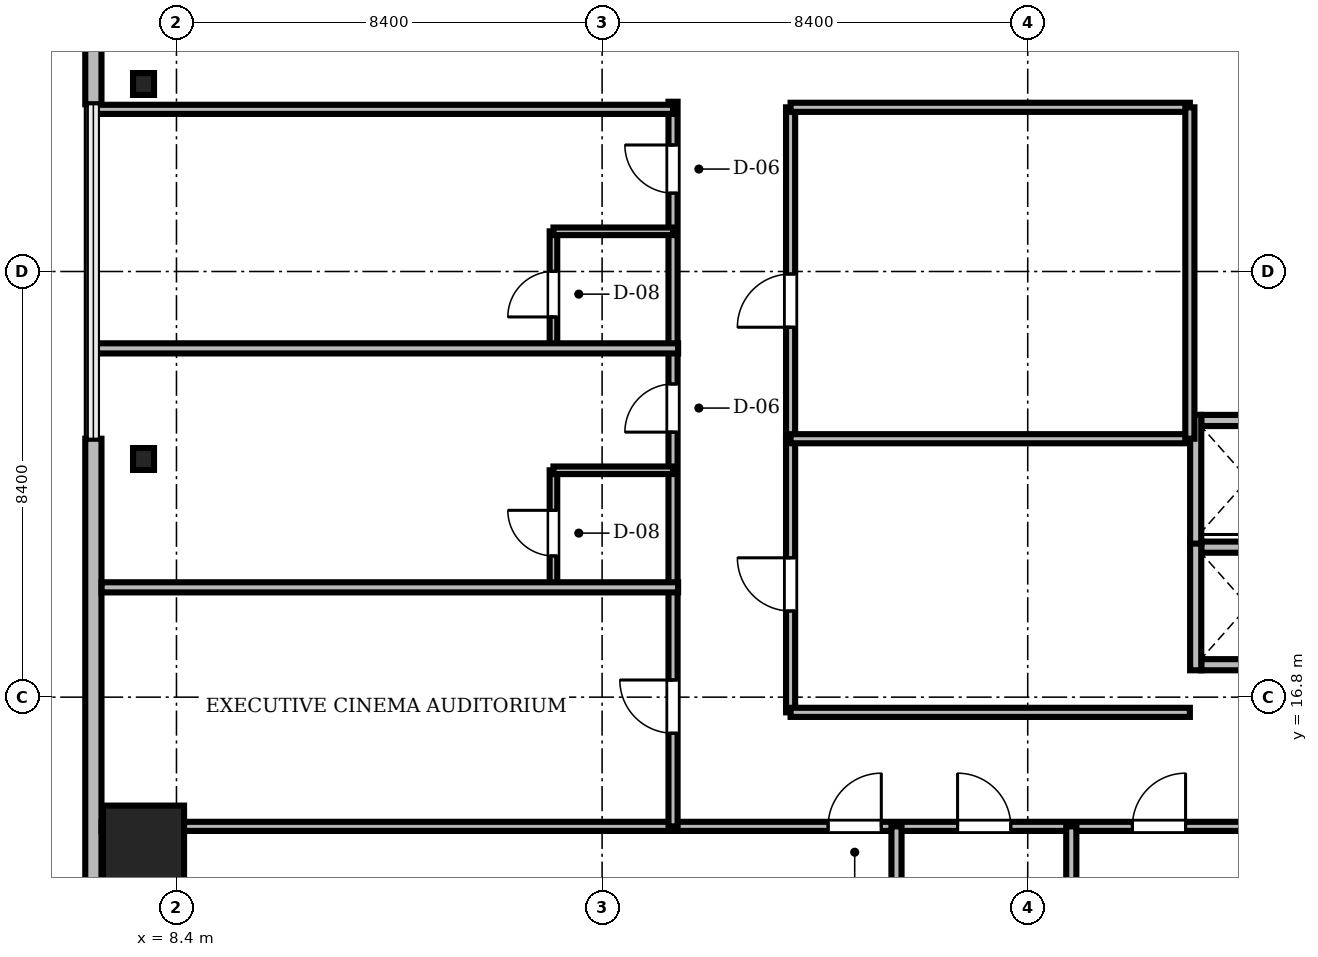
"""IFC4 building model, lengths in metres.
Left out: names, types, materials, properties, quantities, classifications, styles, units other than length and angle.
Written with IfcOpenShell. Run it as: python <this file> out.ifc"""

import sys

from ifc_helpers import new_model, si_unit, direction, frame, frame_2d, origin, origin_2d, place, context, subcontext, project, spatial, rectangle, i_section, extrude, source, transform, mapped, element, fill, save


model = new_model("IFC4")
c1 = context("Model", 3, precision=1e-05, world=origin(), true_north=direction((0.0, 1.0)))
c2 = subcontext(c1, "Body", "Model", "MODEL_VIEW")
j1 = project(units=[si_unit("LENGTHUNIT", "METRE"), si_unit("PLANEANGLEUNIT", "RADIAN")], contexts=[c1])
p1 = place(None, origin())
s1 = spatial("IfcSite", under=j1, at=p1, CompositionType="ELEMENT")
p2 = place(p1, origin())
s2 = spatial("IfcBuilding", under=s1, at=p2, CompositionType="ELEMENT")
p3 = place(p2, frame((0.0, 0.0, 133.5)))
s3 = spatial("IfcBuildingStorey", under=s2, at=p3, CompositionType="ELEMENT", Elevation=133.5)
m1 = source(origin(), c2, "Body", "SweptSolid", [
    extrude(rectangle(XDim=1.6, YDim=1.6, at=origin_2d()), origin(), (0.0, 0.0, 1.0), 3.46),
])
p4 = place(p3, frame((7.75, 13.86, 0.0), z_axis=(0.0, 0.0, 1.0), x_axis=(1.0, 0.0, 0.0)))
e1 = element("IfcColumn", 1, at=p4, inside=s3, PredefinedType="COLUMN", context=c2, shape_type="MappedRepresentation", body=[
    mapped(m1, transform((0.0, 0.0, 0.0), scale=1.0)),
])
m2 = source(origin(), c2, "Body", "SweptSolid", [
    extrude(i_section(OverallWidth=0.414, OverallDepth=0.432, WebThickness=0.026, FlangeThickness=0.04, FilletRadius=0.015, at=origin_2d()), origin(), (0.0, 0.0, 1.0), 3.46),
])
for number, where, z_axis, x_axis in (
    (2, (7.75, 28.9, 0.0), (0.0, 0.0, 1.0), (1.0, 0.0, 0.0)),
    (3, (7.75, 21.5, 0.0), (0.0, 0.0, 1.0), (1.0, 0.0, 0.0)),
):
    element("IfcColumn", number, at=place(p3, frame(where, z_axis=z_axis, x_axis=x_axis)), inside=s3, PredefinedType="COLUMN", context=c2, shape_type="MappedRepresentation", body=[
        mapped(m2, transform((0.0, 0.0, 0.0), scale=1.0)),
    ])
m3 = source(origin(), c2, "Body", "SweptSolid", [
    extrude(rectangle(XDim=15.6, YDim=0.32, at=frame_2d((7.8, 0.0))), origin(), (0.0, 0.0, 1.0), 3.46),
])
p5 = place(p3, frame((6.76, 44.1, 0.0), z_axis=(0.0, 0.0, 1.0), x_axis=(0.0, -1.0, 0.0)))
e4 = element("IfcWall", 4, at=p5, inside=s3, PredefinedType="SOLIDWALL", context=c2, shape_type="MappedRepresentation", body=[
    mapped(m3, transform((0.0, 0.0, 0.0), scale=1.0)),
])
m4 = source(origin(), c2, "Body", "SweptSolid", [
    extrude(rectangle(XDim=1.4, YDim=2.3, at=frame_2d((0.7, 1.15))), frame((0.0, 0.17, 0.0), z_axis=(0.0, -1.0, 0.0), x_axis=(1.0, 0.0, 0.0)), (0.0, 0.0, 1.0), 0.34),
])
p6 = place(p5, frame((9.61, 0.0, 0.0)))
e5 = element("IfcOpeningElement", 5, at=p6, cuts=e4, PredefinedType="OPENING", context=c2, shape_type="MappedRepresentation", body=[
    mapped(m4, transform((0.0, 0.0, 0.0), scale=1.0)),
])
m5 = source(origin(), c2, "Body", "SweptSolid", [
    extrude(rectangle(XDim=2.8, YDim=2.4, at=frame_2d((1.4, 1.2))), frame((0.0, 0.17, 0.0), z_axis=(0.0, -1.0, 0.0), x_axis=(1.0, 0.0, 0.0)), (0.0, 0.0, 1.0), 0.34),
])
p7 = place(p5, frame((2.705, 0.0, 0.72)))
e6 = element("IfcOpeningElement", 6, at=p7, cuts=e4, PredefinedType="OPENING", context=c2, shape_type="MappedRepresentation", body=[
    mapped(m5, transform((0.0, 0.0, 0.0), scale=1.0)),
])
m6 = source(origin(), c2, "Body", "SweptSolid", [
    extrude(rectangle(XDim=15.6, YDim=0.32, at=frame_2d((7.8, 0.0))), origin(), (0.0, 0.0, 1.0), 3.46),
])
p8 = place(p3, frame((6.76, 21.9, 0.0), z_axis=(0.0, 0.0, 1.0), x_axis=(0.0, -1.0, 0.0)))
e7 = element("IfcWall", 7, at=p8, inside=s3, PredefinedType="SOLIDWALL", context=c2, shape_type="MappedRepresentation", body=[
    mapped(m6, transform((0.0, 0.0, 0.0), scale=1.0)),
])
p9 = place(p8, frame((10.095, 0.0, 0.72)))
e8 = element("IfcOpeningElement", 8, at=p9, cuts=e7, PredefinedType="OPENING", context=c2, shape_type="MappedRepresentation", body=[
    mapped(m5, transform((0.0, 0.0, 0.0), scale=1.0)),
])
m7 = source(origin(), c2, "Body", "SweptSolid", [
    extrude(rectangle(XDim=1.85, YDim=0.22, at=frame_2d((0.925, 0.0))), origin(), (0.0, 0.0, 1.0), 3.46),
])
for number, where, z_axis, x_axis in (
    (9, (28.625, 17.44, 0.0), (0.0, 0.0, 1.0), (1.0, 0.0, 0.0)),
    (10, (28.625, 19.76, 0.0), (0.0, 0.0, 1.0), (1.0, 0.0, 0.0)),
):
    element("IfcWall", number, at=place(p3, frame(where, z_axis=z_axis, x_axis=x_axis)), inside=s3, PredefinedType="SOLIDWALL", context=c2, shape_type="MappedRepresentation", body=[
        mapped(m7, transform((0.0, 0.0, 0.0), scale=1.0)),
    ])
m8 = source(origin(), c2, "Body", "SweptSolid", [
    extrude(rectangle(XDim=2.54, YDim=0.22, at=frame_2d((1.27, 0.0))), origin(), (0.0, 0.0, 1.0), 3.46),
])
p10 = place(p3, frame((28.515, 17.33, 0.0), z_axis=(0.0, 0.0, 1.0), x_axis=(0.0, 1.0, 0.0)))
e11 = element("IfcWall", 11, at=p10, inside=s3, PredefinedType="SOLIDWALL", context=c2, shape_type="MappedRepresentation", body=[
    mapped(m8, transform((0.0, 0.0, 0.0), scale=1.0)),
])
p11 = place(p3, frame((28.625, 22.26, 0.0), z_axis=(0.0, 0.0, 1.0), x_axis=(1.0, 0.0, 0.0)))
e12 = element("IfcWall", 12, at=p11, inside=s3, PredefinedType="SOLIDWALL", context=c2, shape_type="MappedRepresentation", body=[
    mapped(m7, transform((0.0, 0.0, 0.0), scale=1.0)),
])
p12 = place(p3, frame((28.515, 19.83, 0.0), z_axis=(0.0, 0.0, 1.0), x_axis=(0.0, 1.0, 0.0)))
e13 = element("IfcWall", 13, at=p12, inside=s3, PredefinedType="SOLIDWALL", context=c2, shape_type="MappedRepresentation", body=[
    mapped(m8, transform((0.0, 0.0, 0.0), scale=1.0)),
])
m9 = source(origin(), c2, "Body", "SweptSolid", [
    extrude(rectangle(XDim=46.156, YDim=0.18, at=frame_2d((23.078, 0.0))), origin(), (0.0, 0.0, 1.0), 2.702),
])
p13 = place(p3, frame((6.922, 14.25, 0.0), z_axis=(0.0, 0.0, 1.0), x_axis=(1.0, 0.0, 0.0)))
e14 = element("IfcWall", 14, at=p13, inside=s3, PredefinedType="PARTITIONING", context=c2, shape_type="MappedRepresentation", body=[
    mapped(m9, transform((0.0, 0.0, 0.0), scale=1.0)),
])
m10 = source(origin(), c2, "Body", "SweptSolid", [
    extrude(rectangle(XDim=1.05, YDim=2.2, at=frame_2d((0.525, 1.1))), frame((0.0, 0.1, 0.0), z_axis=(0.0, -1.0, 0.0), x_axis=(1.0, 0.0, 0.0)), (0.0, 0.0, 1.0), 0.2),
])
p14 = place(p13, frame((14.338, 0.0, 0.0)))
e15 = element("IfcOpeningElement", 15, at=p14, cuts=e14, PredefinedType="OPENING", context=c2, shape_type="MappedRepresentation", body=[
    mapped(m10, transform((0.0, 0.0, 0.0), scale=1.0)),
])
p15 = place(p13, frame((16.893, 0.0, 0.0)))
e16 = element("IfcOpeningElement", 16, at=p15, cuts=e14, PredefinedType="OPENING", context=c2, shape_type="MappedRepresentation", body=[
    mapped(m10, transform((0.0, 0.0, 0.0), scale=1.0)),
])
p16 = place(p13, frame((20.344, 0.0, 0.0)))
e17 = element("IfcOpeningElement", 17, at=p16, cuts=e14, PredefinedType="OPENING", context=c2, shape_type="MappedRepresentation", body=[
    mapped(m10, transform((0.0, 0.0, 0.0), scale=1.0)),
])
p17 = place(p13, frame((23.793, 0.0, 0.0)))
e18 = element("IfcOpeningElement", 18, at=p17, cuts=e14, PredefinedType="OPENING", context=c2, shape_type="MappedRepresentation", body=[
    mapped(m10, transform((0.0, 0.0, 0.0), scale=1.0)),
])
p18 = place(p13, frame((27.479, 0.0, 0.0)))
e19 = element("IfcOpeningElement", 19, at=p18, cuts=e14, PredefinedType="OPENING", context=c2, shape_type="MappedRepresentation", body=[
    mapped(m10, transform((0.0, 0.0, 0.0), scale=1.0)),
])
p19 = place(p13, frame((31.666, 0.0, 0.0)))
e20 = element("IfcOpeningElement", 20, at=p19, cuts=e14, PredefinedType="OPENING", context=c2, shape_type="MappedRepresentation", body=[
    mapped(m10, transform((0.0, 0.0, 0.0), scale=1.0)),
])
p20 = place(p13, frame((36.869, 0.0, 0.0)))
e21 = element("IfcOpeningElement", 21, at=p20, cuts=e14, PredefinedType="OPENING", context=c2, shape_type="MappedRepresentation", body=[
    mapped(m10, transform((0.0, 0.0, 0.0), scale=1.0)),
])
p21 = place(p13, frame((41.828, 0.0, 0.0)))
e22 = element("IfcOpeningElement", 22, at=p21, cuts=e14, PredefinedType="OPENING", context=c2, shape_type="MappedRepresentation", body=[
    mapped(m10, transform((0.0, 0.0, 0.0), scale=1.0)),
])
m11 = source(origin(), c2, "Body", "SweptSolid", [
    extrude(rectangle(XDim=14.3, YDim=0.18, at=frame_2d((7.15, 0.0))), origin(), (0.0, 0.0, 1.0), 2.852),
])
p22 = place(p3, frame((18.2, 14.25, 0.0), z_axis=(0.0, 0.0, 1.0), x_axis=(0.0, 1.0, 0.0)))
e23 = element("IfcWall", 23, at=p22, inside=s3, PredefinedType="PARTITIONING", context=c2, shape_type="MappedRepresentation", body=[
    mapped(m11, transform((0.0, 0.0, 0.0), scale=1.0)),
])
p23 = place(p22, frame((1.838, 0.0, 0.0)))
e24 = element("IfcOpeningElement", 24, at=p23, cuts=e23, PredefinedType="OPENING", context=c2, shape_type="MappedRepresentation", body=[
    mapped(m10, transform((0.0, 0.0, 0.0), scale=1.0)),
])
m12 = source(origin(), c2, "Body", "SweptSolid", [
    extrude(rectangle(XDim=0.95, YDim=2.15, at=frame_2d((0.475, 1.075))), frame((0.0, 0.1, 0.0), z_axis=(0.0, -1.0, 0.0), x_axis=(1.0, 0.0, 0.0)), (0.0, 0.0, 1.0), 0.2),
])
p24 = place(p22, frame((7.78, 0.0, 0.0)))
e25 = element("IfcOpeningElement", 25, at=p24, cuts=e23, PredefinedType="OPENING", context=c2, shape_type="MappedRepresentation", body=[
    mapped(m12, transform((0.0, 0.0, 0.0), scale=1.0)),
])
p25 = place(p22, frame((12.497, 0.0, 0.0)))
e26 = element("IfcOpeningElement", 26, at=p25, cuts=e23, PredefinedType="OPENING", context=c2, shape_type="MappedRepresentation", body=[
    mapped(m12, transform((0.0, 0.0, 0.0), scale=1.0)),
])
m13 = source(origin(), c2, "Body", "SweptSolid", [
    extrude(rectangle(XDim=6.54, YDim=0.18, at=frame_2d((3.27, 0.0))), origin(), (0.0, 0.0, 1.0), 2.852),
])
p26 = place(p3, frame((20.52, 21.9, 0.0), z_axis=(0.0, 0.0, 1.0), x_axis=(0.0, 1.0, 0.0)))
e27 = element("IfcWall", 27, at=p26, inside=s3, PredefinedType="PARTITIONING", context=c2, shape_type="MappedRepresentation", body=[
    mapped(m13, transform((0.0, 0.0, 0.0), scale=1.0)),
])
p27 = place(p26, frame((2.2, 0.0, 0.0)))
e28 = element("IfcOpeningElement", 28, at=p27, cuts=e27, PredefinedType="OPENING", context=c2, shape_type="MappedRepresentation", body=[
    mapped(m10, transform((0.0, 0.0, 0.0), scale=1.0)),
])
m14 = source(origin(), c2, "Body", "SweptSolid", [
    extrude(rectangle(XDim=5.4, YDim=0.18, at=frame_2d((2.7, 0.0))), origin(), (0.0, 0.0, 1.0), 2.852),
])
p28 = place(p3, frame((20.52, 16.5, 0.0), z_axis=(0.0, 0.0, 1.0), x_axis=(0.0, 1.0, 0.0)))
e29 = element("IfcWall", 29, at=p28, inside=s3, PredefinedType="PARTITIONING", context=c2, shape_type="MappedRepresentation", body=[
    mapped(m14, transform((0.0, 0.0, 0.0), scale=1.0)),
])
p29 = place(p28, frame((2.0, 0.0, 0.0)))
e30 = element("IfcOpeningElement", 30, at=p29, cuts=e29, PredefinedType="OPENING", context=c2, shape_type="MappedRepresentation", body=[
    mapped(m10, transform((0.0, 0.0, 0.0), scale=1.0)),
])
m15 = source(origin(), c2, "Body", "SweptSolid", [
    extrude(rectangle(XDim=2.29, YDim=0.15, at=frame_2d((1.145, 0.0))), origin(), (0.0, 0.0, 1.0), 2.852),
])
p30 = place(p3, frame((15.84, 18.987, 0.0), z_axis=(0.0, 0.0, 1.0), x_axis=(0.0, 1.0, 0.0)))
e31 = element("IfcWall", 31, at=p30, inside=s3, PredefinedType="PARTITIONING", context=c2, shape_type="MappedRepresentation", body=[
    mapped(m15, transform((0.0, 0.0, 0.0), scale=1.0)),
])
m16 = source(origin(), c2, "Body", "SweptSolid", [
    extrude(rectangle(XDim=0.9, YDim=2.1, at=frame_2d((0.45, 1.05))), frame((0.0, 0.085, 0.0), z_axis=(0.0, -1.0, 0.0), x_axis=(1.0, 0.0, 0.0)), (0.0, 0.0, 1.0), 0.17),
])
p31 = place(p30, frame((0.6, 0.0, 0.0)))
e32 = element("IfcOpeningElement", 32, at=p31, cuts=e31, PredefinedType="OPENING", context=c2, shape_type="MappedRepresentation", body=[
    mapped(m16, transform((0.0, 0.0, 0.0), scale=1.0)),
])
m17 = source(origin(), c2, "Body", "SweptSolid", [
    extrude(rectangle(XDim=2.29, YDim=0.15, at=frame_2d((1.145, 0.0))), origin(), (0.0, 0.0, 1.0), 3.46),
])
p32 = place(p3, frame((15.84, 23.703, 0.0), z_axis=(0.0, 0.0, 1.0), x_axis=(0.0, 1.0, 0.0)))
e33 = element("IfcWall", 33, at=p32, inside=s3, PredefinedType="PARTITIONING", context=c2, shape_type="MappedRepresentation", body=[
    mapped(m17, transform((0.0, 0.0, 0.0), scale=1.0)),
])
p33 = place(p32, frame((0.6, 0.0, 0.0)))
e34 = element("IfcOpeningElement", 34, at=p33, cuts=e33, PredefinedType="OPENING", context=c2, shape_type="MappedRepresentation", body=[
    mapped(m16, transform((0.0, 0.0, 0.0), scale=1.0)),
])
m18 = source(origin(), c2, "Body", "SweptSolid", [
    extrude(rectangle(XDim=12.128, YDim=0.2, at=frame_2d((6.064, 0.0))), origin(), (0.0, 0.0, 1.0), 2.702),
])
for number, where, z_axis, x_axis in (
    (35, (22.61, 2.122, 0.0), (0.0, 0.0, 1.0), (0.0, 1.0, 0.0)),
    (36, (26.06, 2.122, 0.0), (0.0, 0.0, 1.0), (0.0, 1.0, 0.0)),
):
    element("IfcWall", number, at=place(p3, frame(where, z_axis=z_axis, x_axis=x_axis)), inside=s3, PredefinedType="PARTITIONING", context=c2, shape_type="MappedRepresentation", body=[
        mapped(m18, transform((0.0, 0.0, 0.0), scale=1.0)),
    ])
m19 = source(origin(), c2, "Body", "SweptSolid", [
    extrude(rectangle(XDim=11.378, YDim=0.2, at=frame_2d((5.689, 0.0))), origin(), (0.0, 0.0, 1.0), 2.702),
])
p34 = place(p3, frame((6.922, 18.967, 0.0), z_axis=(0.0, 0.0, 1.0), x_axis=(1.0, 0.0, 0.0)))
e37 = element("IfcWall", 37, at=p34, inside=s3, PredefinedType="PARTITIONING", context=c2, shape_type="MappedRepresentation", body=[
    mapped(m19, transform((0.0, 0.0, 0.0), scale=1.0)),
])
m20 = source(origin(), c2, "Body", "SweptSolid", [
    extrude(rectangle(XDim=11.57, YDim=0.2, at=frame_2d((5.785, 0.0))), origin(), (0.0, 0.0, 1.0), 2.702),
])
p35 = place(p3, frame((6.73, 23.683, 0.0), z_axis=(0.0, 0.0, 1.0), x_axis=(1.0, 0.0, 0.0)))
e38 = element("IfcWall", 38, at=p35, inside=s3, PredefinedType="PARTITIONING", context=c2, shape_type="MappedRepresentation", body=[
    mapped(m20, transform((0.0, 0.0, 0.0), scale=1.0)),
])
m21 = source(origin(), c2, "Body", "SweptSolid", [
    extrude(rectangle(XDim=11.47, YDim=0.18, at=frame_2d((5.735, 0.0))), origin(), (0.0, 0.0, 1.0), 2.702),
])
p36 = place(p3, frame((6.73, 28.4, 0.0), z_axis=(0.0, 0.0, 1.0), x_axis=(1.0, 0.0, 0.0)))
e39 = element("IfcWall", 39, at=p36, inside=s3, PredefinedType="PARTITIONING", context=c2, shape_type="MappedRepresentation", body=[
    mapped(m21, transform((0.0, 0.0, 0.0), scale=1.0)),
])
m22 = source(origin(), c2, "Body", "SweptSolid", [
    extrude(rectangle(XDim=7.88, YDim=0.18, at=frame_2d((3.94, 0.0))), origin(), (0.0, 0.0, 1.0), 3.46),
])
for number, where, z_axis, x_axis in (
    (40, (20.52, 16.5, 0.0), (0.0, 0.0, 1.0), (1.0, 0.0, 0.0)),
    (41, (20.52, 21.9, 0.0), (0.0, 0.0, 1.0), (1.0, 0.0, 0.0)),
    (42, (20.52, 28.44, 0.0), (0.0, 0.0, 1.0), (1.0, 0.0, 0.0)),
):
    element("IfcWall", number, at=place(p3, frame(where, z_axis=z_axis, x_axis=x_axis)), inside=s3, PredefinedType="PARTITIONING", context=c2, shape_type="MappedRepresentation", body=[
        mapped(m22, transform((0.0, 0.0, 0.0), scale=1.0)),
    ])
p37 = place(p3, frame((28.4, 21.9, 0.0), z_axis=(0.0, 0.0, 1.0), x_axis=(0.0, 1.0, 0.0)))
e43 = element("IfcWall", 43, at=p37, inside=s3, PredefinedType="PARTITIONING", context=c2, shape_type="MappedRepresentation", body=[
    mapped(m13, transform((0.0, 0.0, 0.0), scale=1.0)),
])
m23 = source(origin(), c2, "Body", "SweptSolid", [
    extrude(rectangle(XDim=2.36, YDim=0.15, at=frame_2d((1.18, 0.0))), origin(), (0.0, 0.0, 1.0), 3.46),
])
for number, where, z_axis, x_axis in (
    (44, (15.84, 21.277, 0.0), (0.0, 0.0, 1.0), (1.0, 0.0, 0.0)),
    (45, (15.84, 25.993, 0.0), (0.0, 0.0, 1.0), (1.0, 0.0, 0.0)),
):
    element("IfcWall", number, at=place(p3, frame(where, z_axis=z_axis, x_axis=x_axis)), inside=s3, PredefinedType="PARTITIONING", context=c2, shape_type="MappedRepresentation", body=[
        mapped(m23, transform((0.0, 0.0, 0.0), scale=1.0)),
    ])
m24 = source(origin(), c2, "Body", "SweptSolid", [
    extrude(rectangle(XDim=1.05, YDim=2.2, at=frame_2d((0.525, 1.1))), frame((0.0, 0.025, 0.0), z_axis=(0.0, -1.0, 0.0), x_axis=(1.0, 0.0, 0.0)), (0.0, 0.0, 1.0), 0.05),
])
p38 = place(p14, origin())
e46 = element("IfcDoor", 46, at=p38, inside=s3, OperationType="SINGLE_SWING_RIGHT", PredefinedType="DOOR", context=c2, shape_type="MappedRepresentation", body=[
    mapped(m24, transform((0.0, 0.0, 0.0), scale=1.0)),
])
fill(e15, e46)
p39 = place(p15, origin())
e47 = element("IfcDoor", 47, at=p39, inside=s3, OperationType="SINGLE_SWING_LEFT", PredefinedType="DOOR", context=c2, shape_type="MappedRepresentation", body=[
    mapped(m24, transform((0.0, 0.0, 0.0), scale=1.0)),
])
fill(e16, e47)
p40 = place(p16, origin())
e48 = element("IfcDoor", 48, at=p40, inside=s3, OperationType="SINGLE_SWING_RIGHT", PredefinedType="DOOR", context=c2, shape_type="MappedRepresentation", body=[
    mapped(m24, transform((0.0, 0.0, 0.0), scale=1.0)),
])
fill(e17, e48)
p41 = place(p23, origin())
e49 = element("IfcDoor", 49, at=p41, inside=s3, OperationType="SINGLE_SWING_RIGHT", PredefinedType="DOOR", context=c2, shape_type="MappedRepresentation", body=[
    mapped(m24, transform((0.0, 0.0, 0.0), scale=1.0)),
])
fill(e24, e49)
m25 = source(origin(), c2, "Body", "SweptSolid", [
    extrude(rectangle(XDim=0.95, YDim=2.15, at=frame_2d((0.475, 1.075))), frame((0.0, 0.025, 0.0), z_axis=(0.0, -1.0, 0.0), x_axis=(1.0, 0.0, 0.0)), (0.0, 0.0, 1.0), 0.05),
])
p42 = place(p24, origin())
e50 = element("IfcDoor", 50, at=p42, inside=s3, OperationType="SINGLE_SWING_LEFT", PredefinedType="DOOR", context=c2, shape_type="MappedRepresentation", body=[
    mapped(m25, transform((0.0, 0.0, 0.0), scale=1.0)),
])
fill(e25, e50)
p43 = place(p25, origin())
e51 = element("IfcDoor", 51, at=p43, inside=s3, OperationType="SINGLE_SWING_RIGHT", PredefinedType="DOOR", context=c2, shape_type="MappedRepresentation", body=[
    mapped(m25, transform((0.0, 0.0, 0.0), scale=1.0)),
])
fill(e26, e51)
p44 = place(p27, origin())
e52 = element("IfcDoor", 52, at=p44, inside=s3, OperationType="SINGLE_SWING_LEFT", PredefinedType="DOOR", context=c2, shape_type="MappedRepresentation", body=[
    mapped(m24, transform((0.0, 0.0, 0.0), scale=1.0)),
])
fill(e28, e52)
p45 = place(p29, origin())
e53 = element("IfcDoor", 53, at=p45, inside=s3, OperationType="SINGLE_SWING_RIGHT", PredefinedType="DOOR", context=c2, shape_type="MappedRepresentation", body=[
    mapped(m24, transform((0.0, 0.0, 0.0), scale=1.0)),
])
fill(e30, e53)
m26 = source(origin(), c2, "Body", "SweptSolid", [
    extrude(rectangle(XDim=0.9, YDim=2.1, at=frame_2d((0.45, 1.05))), frame((0.0, 0.025, 0.0), z_axis=(0.0, -1.0, 0.0), x_axis=(1.0, 0.0, 0.0)), (0.0, 0.0, 1.0), 0.05),
])
p46 = place(p31, origin())
e54 = element("IfcDoor", 54, at=p46, inside=s3, OperationType="SINGLE_SWING_RIGHT", PredefinedType="DOOR", context=c2, shape_type="MappedRepresentation", body=[
    mapped(m26, transform((0.0, 0.0, 0.0), scale=1.0)),
])
fill(e32, e54)
p47 = place(p33, origin())
e55 = element("IfcDoor", 55, at=p47, inside=s3, OperationType="SINGLE_SWING_LEFT", PredefinedType="DOOR", context=c2, shape_type="MappedRepresentation", body=[
    mapped(m26, transform((0.0, 0.0, 0.0), scale=1.0)),
])
fill(e34, e55)
save(model, sys.argv[1])
